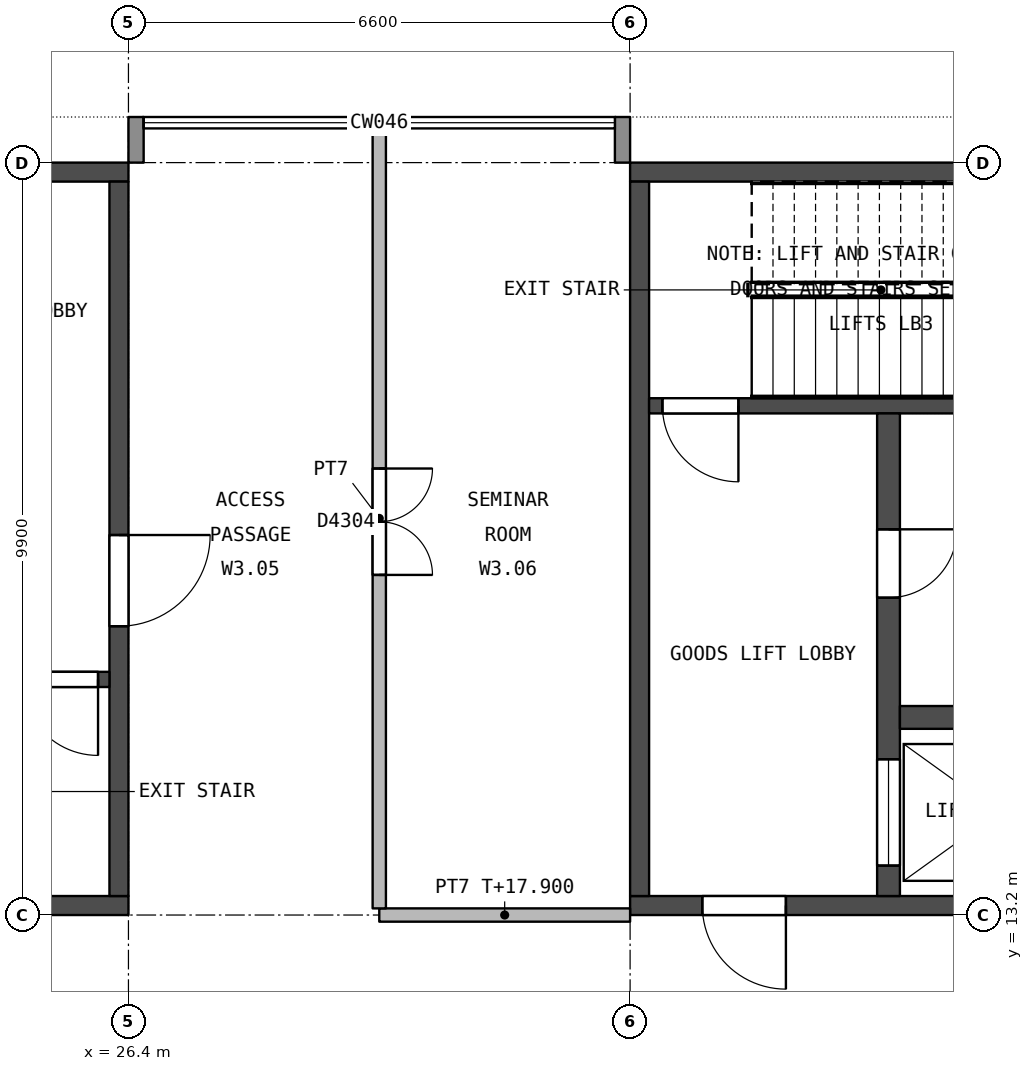
"""IFC4 building model, lengths in metres.
Left out: names, types, materials, properties, quantities, classifications, styles, units other than length and angle.
Written with IfcOpenShell. Run it as: python <this file> out.ifc"""

import sys

from ifc_helpers import new_model, si_unit, direction, frame, frame_2d, origin, place, context, subcontext, project, spatial, rectangle, extrude, element, fill, save


model = new_model("IFC4")
c1 = context("Model", 3, precision=1e-05, world=origin(), true_north=direction((0.0, 1.0)))
c2 = subcontext(c1, "Body", "Model", "MODEL_VIEW")
j1 = project(units=[si_unit("LENGTHUNIT", "METRE"), si_unit("PLANEANGLEUNIT", "RADIAN")], contexts=[c1])
p1 = place(None, origin())
s1 = spatial("IfcSite", under=j1, at=p1, CompositionType="ELEMENT")
p2 = place(p1, origin())
s2 = spatial("IfcBuilding", under=s1, at=p2, CompositionType="ELEMENT")
p3 = place(p2, frame((0.0, 0.0, 14.4)))
s3 = spatial("IfcBuildingStorey", under=s2, at=p3, CompositionType="ELEMENT", Elevation=14.4)
for number, where, z_axis, x_axis in (
    (1, (19.8, 13.325, 0.0), (0.0, 0.0, 1.0), (1.0, 0.0, 0.0)),
    (2, (19.8, 22.975, 0.0), (0.0, 0.0, 1.0), (1.0, 0.0, 0.0)),
):
    element("IfcWall", number, at=place(p3, frame(where, z_axis=z_axis, x_axis=x_axis)), inside=s3, PredefinedType="SHEAR", context=c2, shape_type="SweptSolid", body=[
        extrude(rectangle(XDim=6.6, YDim=0.25, at=frame_2d((3.3, 0.0))), origin(), (0.0, 0.0, 1.0), 4.2),
    ])
p4 = place(p3, frame((26.275, 13.45, 0.0), z_axis=(0.0, 0.0, 1.0), x_axis=(0.0, 1.0, 0.0)))
e3 = element("IfcWall", 3, at=p4, inside=s3, PredefinedType="SHEAR", context=c2, shape_type="SweptSolid", body=[
    extrude(rectangle(XDim=9.4, YDim=0.25, at=frame_2d((4.7, 0.0))), origin(), (0.0, 0.0, 1.0), 4.2),
])
p5 = place(p4, frame((3.55, 0.0, 0.0)))
e4 = element("IfcOpeningElement", 4, at=p5, cuts=e3, PredefinedType="OPENING", context=c2, shape_type="SweptSolid", body=[
    extrude(rectangle(XDim=1.2, YDim=2.1, at=frame_2d((0.6, 1.05))), frame((0.0, 0.135, 0.0), z_axis=(0.0, -1.0, 0.0), x_axis=(1.0, 0.0, 0.0)), (0.0, 0.0, 1.0), 0.27),
])
p6 = place(p3, frame((20.05, 16.3, 0.0), z_axis=(0.0, 0.0, 1.0), x_axis=(1.0, 0.0, 0.0)))
e5 = element("IfcWall", 5, at=p6, inside=s3, PredefinedType="SHEAR", context=c2, shape_type="SweptSolid", body=[
    extrude(rectangle(XDim=6.1, YDim=0.2, at=frame_2d((3.05, 0.0))), origin(), (0.0, 0.0, 1.0), 4.2),
])
p7 = place(p6, frame((4.95, 0.0, 0.0)))
e6 = element("IfcOpeningElement", 6, at=p7, cuts=e5, PredefinedType="OPENING", context=c2, shape_type="SweptSolid", body=[
    extrude(rectangle(XDim=1.0, YDim=2.2, at=frame_2d((0.5, 1.1))), frame((0.0, 0.11, 0.0), z_axis=(0.0, -1.0, 0.0), x_axis=(1.0, 0.0, 0.0)), (0.0, 0.0, 1.0), 0.22),
])
p8 = place(p3, frame((33.0, 13.325, 0.0), z_axis=(0.0, 0.0, 1.0), x_axis=(1.0, 0.0, 0.0)))
e7 = element("IfcWall", 7, at=p8, inside=s3, PredefinedType="SHEAR", context=c2, shape_type="SweptSolid", body=[
    extrude(rectangle(XDim=6.6, YDim=0.25, at=frame_2d((3.3, 0.0))), origin(), (0.0, 0.0, 1.0), 4.2),
])
p9 = place(p8, frame((0.95, 0.0, 0.0)))
e8 = element("IfcOpeningElement", 8, at=p9, cuts=e7, PredefinedType="OPENING", context=c2, shape_type="SweptSolid", body=[
    extrude(rectangle(XDim=1.1, YDim=2.1, at=frame_2d((0.55, 1.05))), frame((0.0, 0.135, 0.0), z_axis=(0.0, -1.0, 0.0), x_axis=(1.0, 0.0, 0.0)), (0.0, 0.0, 1.0), 0.27),
])
p10 = place(p3, frame((33.0, 22.975, 0.0), z_axis=(0.0, 0.0, 1.0), x_axis=(1.0, 0.0, 0.0)))
e9 = element("IfcWall", 9, at=p10, inside=s3, PredefinedType="SHEAR", context=c2, shape_type="SweptSolid", body=[
    extrude(rectangle(XDim=6.6, YDim=0.25, at=frame_2d((3.3, 0.0))), origin(), (0.0, 0.0, 1.0), 4.2),
])
p11 = place(p3, frame((33.125, 13.45, 0.0), z_axis=(0.0, 0.0, 1.0), x_axis=(0.0, 1.0, 0.0)))
e10 = element("IfcWall", 10, at=p11, inside=s3, PredefinedType="SHEAR", context=c2, shape_type="SweptSolid", body=[
    extrude(rectangle(XDim=9.4, YDim=0.25, at=frame_2d((4.7, 0.0))), origin(), (0.0, 0.0, 1.0), 4.2),
])
p12 = place(p3, frame((33.25, 19.9, 0.0), z_axis=(0.0, 0.0, 1.0), x_axis=(1.0, 0.0, 0.0)))
e11 = element("IfcWall", 11, at=p12, inside=s3, PredefinedType="SHEAR", context=c2, shape_type="SweptSolid", body=[
    extrude(rectangle(XDim=6.1, YDim=0.2, at=frame_2d((3.05, 0.0))), origin(), (0.0, 0.0, 1.0), 4.2),
])
p13 = place(p12, frame((0.175, 0.0, 0.0)))
e12 = element("IfcOpeningElement", 12, at=p13, cuts=e11, PredefinedType="OPENING", context=c2, shape_type="SweptSolid", body=[
    extrude(rectangle(XDim=1.0, YDim=2.1, at=frame_2d((0.5, 1.05))), frame((0.0, 0.11, 0.0), z_axis=(0.0, -1.0, 0.0), x_axis=(1.0, 0.0, 0.0)), (0.0, 0.0, 1.0), 0.22),
])
p14 = place(p3, frame((36.4, 13.45, 0.0), z_axis=(0.0, 0.0, 1.0), x_axis=(0.0, 1.0, 0.0)))
e13 = element("IfcWall", 13, at=p14, inside=s3, PredefinedType="SHEAR", context=c2, shape_type="SweptSolid", body=[
    extrude(rectangle(XDim=6.35, YDim=0.3, at=frame_2d((3.175, 0.0))), origin(), (0.0, 0.0, 1.0), 4.2),
])
p15 = place(p14, frame((3.925, 0.0, 0.0)))
e14 = element("IfcOpeningElement", 14, at=p15, cuts=e13, PredefinedType="OPENING", context=c2, shape_type="SweptSolid", body=[
    extrude(rectangle(XDim=0.9, YDim=2.1, at=frame_2d((0.45, 1.05))), frame((0.0, 0.16, 0.0), z_axis=(0.0, -1.0, 0.0), x_axis=(1.0, 0.0, 0.0)), (0.0, 0.0, 1.0), 0.32),
])
p16 = place(p14, frame((0.4, 0.0, 0.0)))
e15 = element("IfcOpeningElement", 15, at=p16, cuts=e13, PredefinedType="OPENING", context=c2, shape_type="SweptSolid", body=[
    extrude(rectangle(XDim=1.4, YDim=2.4, at=frame_2d((0.7, 1.2))), frame((0.0, 0.16, 0.0), z_axis=(0.0, -1.0, 0.0), x_axis=(1.0, 0.0, 0.0)), (0.0, 0.0, 1.0), 0.32),
])
p17 = place(p3, frame((36.55, 15.8, 0.0), z_axis=(0.0, 0.0, 1.0), x_axis=(1.0, 0.0, 0.0)))
e16 = element("IfcWall", 16, at=p17, inside=s3, PredefinedType="SHEAR", context=c2, shape_type="SweptSolid", body=[
    extrude(rectangle(XDim=2.8, YDim=0.3, at=frame_2d((1.4, 0.0))), origin(), (0.0, 0.0, 1.0), 4.2),
])
for number, where, z_axis, x_axis in (
    (17, (26.5, 23.1, 0.0), (0.0, 0.0, 1.0), (0.0, 1.0, 0.0)),
    (18, (32.9, 23.1, 0.0), (0.0, 0.0, 1.0), (0.0, 1.0, 0.0)),
):
    element("IfcWall", number, at=place(p3, frame(where, z_axis=z_axis, x_axis=x_axis)), inside=s3, PredefinedType="STANDARD", context=c2, shape_type="SweptSolid", body=[
        extrude(rectangle(XDim=0.6, YDim=0.2, at=frame_2d((0.3, 0.0))), origin(), (0.0, 0.0, 1.0), 3.5),
    ])
p18 = place(p3, frame((33.0, 13.2, 0.0), z_axis=(0.0, 0.0, 1.0), x_axis=(-1.0, 0.0, 0.0)))
e19 = element("IfcWall", 19, at=p18, inside=s3, PredefinedType="PARTITIONING", context=c2, shape_type="SweptSolid", body=[
    extrude(rectangle(XDim=3.3, YDim=0.175, at=frame_2d((1.65, 0.0))), origin(), (0.0, 0.0, 1.0), 3.5),
])
p19 = place(p3, frame((29.7, 23.55, 0.0), z_axis=(0.0, 0.0, 1.0), x_axis=(0.0, -1.0, 0.0)))
e20 = element("IfcWall", 20, at=p19, inside=s3, PredefinedType="PARTITIONING", context=c2, shape_type="SweptSolid", body=[
    extrude(rectangle(XDim=10.262, YDim=0.175, at=frame_2d((5.131, 0.0))), origin(), (0.0, 0.0, 1.0), 4.2),
])
p20 = place(p19, frame((4.475, 0.0, 0.0)))
e21 = element("IfcOpeningElement", 21, at=p20, cuts=e20, PredefinedType="OPENING", context=c2, shape_type="SweptSolid", body=[
    extrude(rectangle(XDim=1.4, YDim=2.1, at=frame_2d((0.7, 1.05))), frame((0.0, 0.097, 0.0), z_axis=(0.0, -1.0, 0.0), x_axis=(1.0, 0.0, 0.0)), (0.0, 0.0, 1.0), 0.195),
])
p21 = place(p5, origin())
e22 = element("IfcDoor", 22, at=p21, inside=s3, OperationType="SINGLE_SWING_RIGHT", PredefinedType="DOOR", context=c2, shape_type="SweptSolid", body=[
    extrude(rectangle(XDim=1.2, YDim=2.1, at=frame_2d((0.6, 1.05))), frame((0.0, 0.025, 0.0), z_axis=(0.0, -1.0, 0.0), x_axis=(1.0, 0.0, 0.0)), (0.0, 0.0, 1.0), 0.05),
])
fill(e4, e22)
p22 = place(p7, origin())
e23 = element("IfcDoor", 23, at=p22, inside=s3, OperationType="SINGLE_SWING_RIGHT", PredefinedType="DOOR", context=c2, shape_type="SweptSolid", body=[
    extrude(rectangle(XDim=1.0, YDim=2.2, at=frame_2d((0.5, 1.1))), frame((0.0, 0.025, 0.0), z_axis=(0.0, -1.0, 0.0), x_axis=(1.0, 0.0, 0.0)), (0.0, 0.0, 1.0), 0.05),
])
fill(e6, e23)
p23 = place(p15, origin())
e24 = element("IfcDoor", 24, at=p23, inside=s3, OperationType="SINGLE_SWING_RIGHT", PredefinedType="DOOR", context=c2, shape_type="SweptSolid", body=[
    extrude(rectangle(XDim=0.9, YDim=2.1, at=frame_2d((0.45, 1.05))), frame((0.0, 0.025, 0.0), z_axis=(0.0, -1.0, 0.0), x_axis=(1.0, 0.0, 0.0)), (0.0, 0.0, 1.0), 0.05),
])
fill(e14, e24)
p24 = place(p9, origin())
e25 = element("IfcDoor", 25, at=p24, inside=s3, OperationType="SINGLE_SWING_RIGHT", PredefinedType="DOOR", context=c2, shape_type="SweptSolid", body=[
    extrude(rectangle(XDim=1.1, YDim=2.1, at=frame_2d((0.55, 1.05))), frame((0.0, 0.025, 0.0), z_axis=(0.0, -1.0, 0.0), x_axis=(1.0, 0.0, 0.0)), (0.0, 0.0, 1.0), 0.05),
])
fill(e8, e25)
p25 = place(p13, origin())
e26 = element("IfcDoor", 26, at=p25, inside=s3, OperationType="SINGLE_SWING_RIGHT", PredefinedType="DOOR", context=c2, shape_type="SweptSolid", body=[
    extrude(rectangle(XDim=1.0, YDim=2.1, at=frame_2d((0.5, 1.05))), frame((0.0, 0.025, 0.0), z_axis=(0.0, -1.0, 0.0), x_axis=(1.0, 0.0, 0.0)), (0.0, 0.0, 1.0), 0.05),
])
fill(e12, e26)
p26 = place(p16, origin())
e27 = element("IfcDoor", 27, at=p26, inside=s3, OperationType="DOUBLE_DOOR_SLIDING", PredefinedType="NOTDEFINED", context=c2, shape_type="SweptSolid", body=[
    extrude(rectangle(XDim=1.4, YDim=2.4, at=frame_2d((0.7, 1.2))), frame((0.0, 0.025, 0.0), z_axis=(0.0, -1.0, 0.0), x_axis=(1.0, 0.0, 0.0)), (0.0, 0.0, 1.0), 0.05),
])
fill(e15, e27)
p27 = place(p20, origin())
e28 = element("IfcDoor", 28, at=p27, inside=s3, OperationType="DOUBLE_DOOR_SINGLE_SWING", PredefinedType="DOOR", context=c2, shape_type="SweptSolid", body=[
    extrude(rectangle(XDim=1.4, YDim=2.1, at=frame_2d((0.7, 1.05))), frame((0.0, 0.027, 0.0), z_axis=(0.0, -1.0, 0.0), x_axis=(1.0, 0.0, 0.0)), (0.0, 0.0, 1.0), 0.054),
])
fill(e21, e28)
save(model, sys.argv[1])
